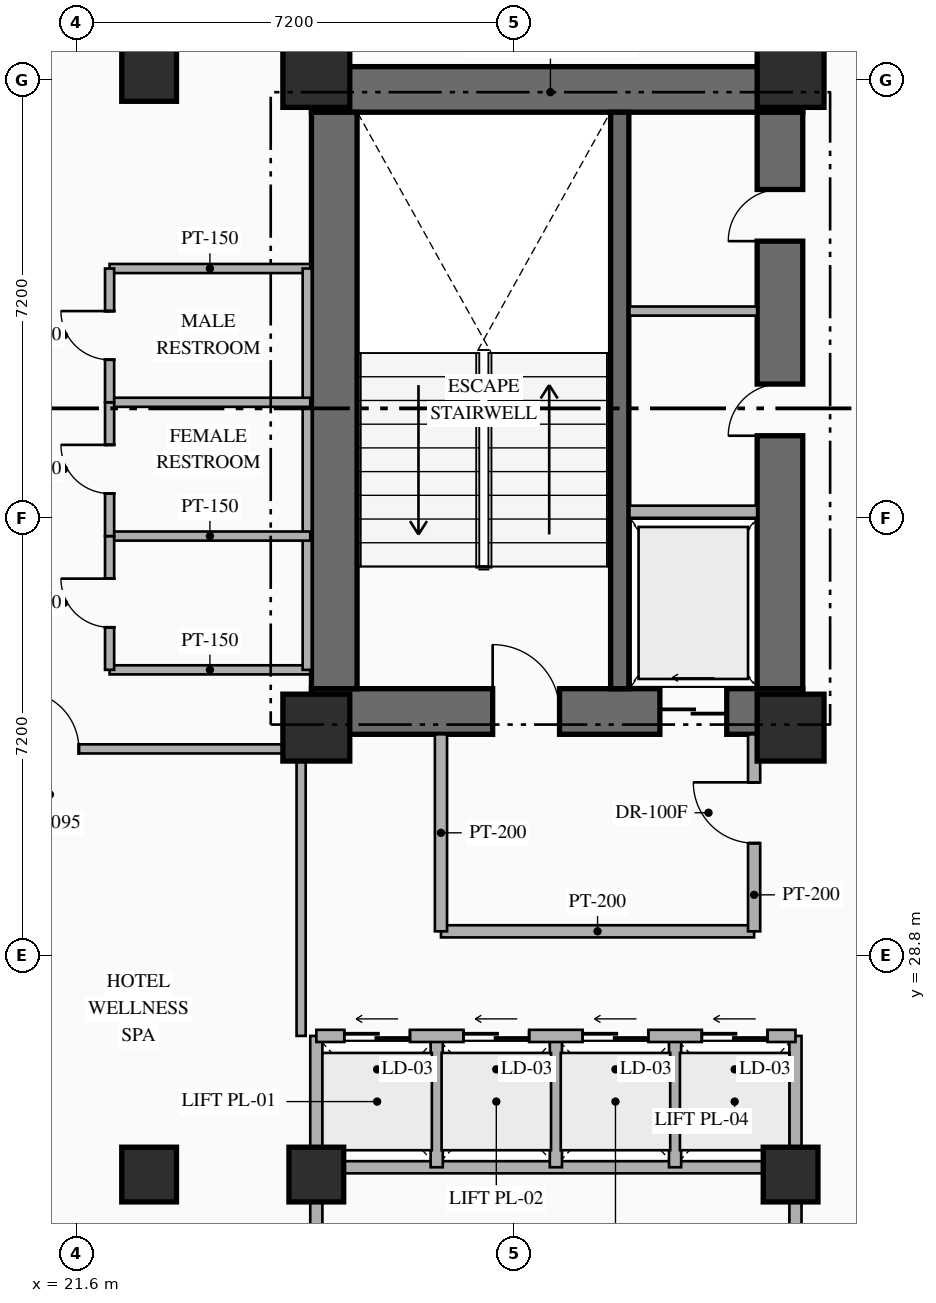
"""IFC4 building model, lengths in metres.
Left out: names, types, materials, properties, quantities, classifications, styles, units other than length and angle.
Written with IfcOpenShell. Run it as: python <this file> out.ifc"""

import sys

from ifc_helpers import new_model, si_unit, direction, frame, frame_2d, origin, origin_2d, place, context, subcontext, project, spatial, rectangle, hollow_rectangle, extrude, element, fill, save


model = new_model("IFC4")
c1 = context("Model", 3, precision=1e-05, world=origin(), true_north=direction((0.0, 1.0)))
c2 = subcontext(c1, "Body", "Model", "MODEL_VIEW")
j1 = project(units=[si_unit("LENGTHUNIT", "METRE"), si_unit("PLANEANGLEUNIT", "RADIAN")], contexts=[c1])
p1 = place(None, origin())
s1 = spatial("IfcSite", under=j1, at=p1, CompositionType="ELEMENT")
p2 = place(p1, origin())
s2 = spatial("IfcBuilding", under=s1, at=p2, CompositionType="ELEMENT")
p3 = place(p2, frame((0.0, 0.0, 88.0)))
s3 = spatial("IfcBuildingStorey", under=s2, at=p3, CompositionType="ELEMENT", Elevation=88.0)
p4 = place(p3, frame((25.47, 32.815, 0.0), z_axis=(0.0, 0.0, 1.0), x_axis=(1.0, 0.0, 0.0)))
e1 = element("IfcWall", 1, at=p4, inside=s3, PredefinedType="SHEAR", context=c2, shape_type="SweptSolid", body=[
    extrude(rectangle(XDim=8.08, YDim=0.75, at=frame_2d((4.04, 0.0))), origin(), (0.0, 0.0, 1.0), 3.35),
])
p5 = place(p4, frame((2.98, 0.0, 0.0)))
e2 = element("IfcOpeningElement", 2, at=p5, cuts=e1, PredefinedType="OPENING", context=c2, shape_type="SweptSolid", body=[
    extrude(rectangle(XDim=1.1, YDim=2.2, at=frame_2d((0.55, 1.1))), frame((0.0, 0.385, 0.0), z_axis=(0.0, -1.0, 0.0), x_axis=(1.0, 0.0, 0.0)), (0.0, 0.0, 1.0), 0.77),
])
p6 = place(p4, frame((5.73, 0.0, 0.0)))
e3 = element("IfcOpeningElement", 3, at=p6, cuts=e1, PredefinedType="OPENING", context=c2, shape_type="SweptSolid", body=[
    extrude(rectangle(XDim=1.1, YDim=2.15, at=frame_2d((0.55, 1.075))), frame((0.0, 0.385, 0.0), z_axis=(0.0, -1.0, 0.0), x_axis=(1.0, 0.0, 0.0)), (0.0, 0.0, 1.0), 0.77),
])
p7 = place(p3, frame((25.47, 43.045, 0.0), z_axis=(0.0, 0.0, 1.0), x_axis=(1.0, 0.0, 0.0)))
e4 = element("IfcWall", 4, at=p7, inside=s3, PredefinedType="SHEAR", context=c2, shape_type="SweptSolid", body=[
    extrude(rectangle(XDim=8.08, YDim=0.75, at=frame_2d((4.04, 0.0))), origin(), (0.0, 0.0, 1.0), 3.35),
])
p8 = place(p3, frame((25.845, 33.19, 0.0), z_axis=(0.0, 0.0, 1.0), x_axis=(0.0, 1.0, 0.0)))
e5 = element("IfcWall", 5, at=p8, inside=s3, PredefinedType="SHEAR", context=c2, shape_type="SweptSolid", body=[
    extrude(rectangle(XDim=9.48, YDim=0.75, at=frame_2d((4.74, 0.0))), origin(), (0.0, 0.0, 1.0), 3.35),
])
p9 = place(p3, frame((33.175, 33.19, 0.0), z_axis=(0.0, 0.0, 1.0), x_axis=(0.0, 1.0, 0.0)))
e6 = element("IfcWall", 6, at=p9, inside=s3, PredefinedType="SHEAR", context=c2, shape_type="SweptSolid", body=[
    extrude(rectangle(XDim=9.48, YDim=0.75, at=frame_2d((4.74, 0.0))), origin(), (0.0, 0.0, 1.0), 3.35),
])
p10 = place(p9, frame((4.16, 0.0, 0.0)))
e7 = element("IfcOpeningElement", 7, at=p10, cuts=e6, PredefinedType="OPENING", context=c2, shape_type="SweptSolid", body=[
    extrude(rectangle(XDim=0.85, YDim=2.08, at=frame_2d((0.425, 1.04))), frame((0.0, 0.385, 0.0), z_axis=(0.0, -1.0, 0.0), x_axis=(1.0, 0.0, 0.0)), (0.0, 0.0, 1.0), 0.77),
])
p11 = place(p9, frame((7.36, 0.0, 0.0)))
e8 = element("IfcOpeningElement", 8, at=p11, cuts=e6, PredefinedType="OPENING", context=c2, shape_type="SweptSolid", body=[
    extrude(rectangle(XDim=0.85, YDim=2.08, at=frame_2d((0.425, 1.04))), frame((0.0, 0.385, 0.0), z_axis=(0.0, -1.0, 0.0), x_axis=(1.0, 0.0, 0.0)), (0.0, 0.0, 1.0), 0.77),
])
p12 = place(p3, frame((30.54, 33.19, 0.0), z_axis=(0.0, 0.0, 1.0), x_axis=(0.0, 1.0, 0.0)))
e9 = element("IfcWall", 9, at=p12, inside=s3, PredefinedType="SHEAR", context=c2, shape_type="SweptSolid", body=[
    extrude(rectangle(XDim=9.48, YDim=0.3, at=frame_2d((4.74, 0.0))), origin(), (0.0, 0.0, 1.0), 3.35),
])
for number, where, z_axis, x_axis in (
    (10, (25.55, 32.55, 0.0), (0.0, 0.0, 1.0), (1.0, 0.0, 0.0)),
    (11, (33.35, 32.55, 0.0), (0.0, 0.0, 1.0), (1.0, 0.0, 0.0)),
    (12, (25.55, 43.3, 0.0), (0.0, 0.0, 1.0), (1.0, 0.0, 0.0)),
    (13, (33.35, 43.3, 0.0), (0.0, 0.0, 1.0), (1.0, 0.0, 0.0)),
):
    element("IfcColumn", number, at=place(p3, frame(where, z_axis=z_axis, x_axis=x_axis)), inside=s3, PredefinedType="COLUMN", context=c2, shape_type="SweptSolid", body=[
        extrude(rectangle(XDim=1.1, YDim=1.1, at=origin_2d()), origin(), (0.0, 0.0, 1.0), 3.35),
    ])
for number, where, z_axis, x_axis in (
    (14, (25.55, 25.2, 0.0), (0.0, 0.0, 1.0), (1.0, 0.0, 0.0)),
    (15, (33.35, 25.2, 0.0), (0.0, 0.0, 1.0), (1.0, 0.0, 0.0)),
    (16, (22.8, 25.2, 0.0), (0.0, 0.0, 1.0), (1.0, 0.0, 0.0)),
    (17, (22.8, 43.3, 0.0), (0.0, 0.0, 1.0), (1.0, 0.0, 0.0)),
):
    element("IfcColumn", number, at=place(p3, frame(where, z_axis=z_axis, x_axis=x_axis)), inside=s3, PredefinedType="COLUMN", context=c2, shape_type="SweptSolid", body=[
        extrude(hollow_rectangle(XDim=0.9, YDim=0.9, WallThickness=0.036, at=origin_2d()), origin(), (0.0, 0.0, 1.0), 3.35),
    ])
p13 = place(p3, frame((30.7, 36.1, 0.0), z_axis=(0.0, 0.0, 1.0), x_axis=(1.0, 0.0, 0.0)))
e18 = element("IfcWall", 18, at=p13, inside=s3, PredefinedType="STANDARD", context=c2, shape_type="SweptSolid", body=[
    extrude(rectangle(XDim=2.1, YDim=0.2, at=frame_2d((1.05, 0.0))), origin(), (0.0, 0.0, 1.0), 3.05),
])
p14 = place(p3, frame((30.7, 39.4, 0.0), z_axis=(0.0, 0.0, 1.0), x_axis=(1.0, 0.0, 0.0)))
e19 = element("IfcWall", 19, at=p14, inside=s3, PredefinedType="PARTITIONING", context=c2, shape_type="SweptSolid", body=[
    extrude(rectangle(XDim=2.1, YDim=0.15, at=frame_2d((1.05, 0.0))), origin(), (0.0, 0.0, 1.0), 3.05),
])
p15 = place(p3, frame((27.6, 29.2, 0.0), z_axis=(0.0, 0.0, 1.0), x_axis=(1.0, 0.0, 0.0)))
e20 = element("IfcWall", 20, at=p15, inside=s3, PredefinedType="STANDARD", context=c2, shape_type="SweptSolid", body=[
    extrude(rectangle(XDim=5.15, YDim=0.2, at=frame_2d((2.575, 0.0))), origin(), (0.0, 0.0, 1.0), 3.05),
])
p16 = place(p3, frame((27.6, 29.2, 0.0), z_axis=(0.0, 0.0, 1.0), x_axis=(0.0, 1.0, 0.0)))
e21 = element("IfcWall", 21, at=p16, inside=s3, PredefinedType="STANDARD", context=c2, shape_type="SweptSolid", body=[
    extrude(rectangle(XDim=3.24, YDim=0.2, at=frame_2d((1.62, 0.0))), origin(), (0.0, 0.0, 1.0), 3.05),
])
p17 = place(p3, frame((32.75, 29.2, 0.0), z_axis=(0.0, 0.0, 1.0), x_axis=(0.0, 1.0, 0.0)))
e22 = element("IfcWall", 22, at=p17, inside=s3, PredefinedType="STANDARD", context=c2, shape_type="SweptSolid", body=[
    extrude(rectangle(XDim=3.24, YDim=0.2, at=frame_2d((1.62, 0.0))), origin(), (0.0, 0.0, 1.0), 3.05),
])
p18 = place(p17, frame((1.45, 0.0, 0.0)))
e23 = element("IfcOpeningElement", 23, at=p18, cuts=e22, PredefinedType="OPENING", context=c2, shape_type="SweptSolid", body=[
    extrude(rectangle(XDim=1.0, YDim=2.2, at=frame_2d((0.5, 1.1))), frame((0.0, 0.11, 0.0), z_axis=(0.0, -1.0, 0.0), x_axis=(1.0, 0.0, 0.0)), (0.0, 0.0, 1.0), 0.22),
])
for number, where, z_axis, x_axis in (
    (24, (25.55, 23.4, 0.0), (0.0, 0.0, 1.0), (0.0, 1.0, 0.0)),
    (25, (33.43, 23.4, 0.0), (0.0, 0.0, 1.0), (0.0, 1.0, 0.0)),
):
    element("IfcWall", number, at=place(p3, frame(where, z_axis=z_axis, x_axis=x_axis)), inside=s3, PredefinedType="STANDARD", context=c2, shape_type="SweptSolid", body=[
        extrude(rectangle(XDim=4.08, YDim=0.2, at=frame_2d((2.04, 0.0))), origin(), (0.0, 0.0, 1.0), 2.345),
    ])
p19 = place(p3, frame((25.55, 25.32, 0.0), z_axis=(0.0, 0.0, 1.0), x_axis=(1.0, 0.0, 0.0)))
e26 = element("IfcWall", 26, at=p19, inside=s3, PredefinedType="STANDARD", context=c2, shape_type="SweptSolid", body=[
    extrude(rectangle(XDim=7.88, YDim=0.2, at=frame_2d((3.94, 0.0))), origin(), (0.0, 0.0, 1.0), 2.445),
])
for number, where, z_axis, x_axis in (
    (27, (27.53, 25.32, 0.0), (0.0, 0.0, 1.0), (0.0, 1.0, 0.0)),
    (28, (29.49, 25.32, 0.0), (0.0, 0.0, 1.0), (0.0, 1.0, 0.0)),
    (29, (31.45, 25.32, 0.0), (0.0, 0.0, 1.0), (0.0, 1.0, 0.0)),
):
    element("IfcWall", number, at=place(p3, frame(where, z_axis=z_axis, x_axis=x_axis)), inside=s3, PredefinedType="STANDARD", context=c2, shape_type="SweptSolid", body=[
        extrude(rectangle(XDim=2.16, YDim=0.2, at=frame_2d((1.08, 0.0))), origin(), (0.0, 0.0, 1.0), 3.05),
    ])
p20 = place(p3, frame((25.55, 27.48, 0.0), z_axis=(0.0, 0.0, 1.0), x_axis=(1.0, 0.0, 0.0)))
e30 = element("IfcWall", 30, at=p20, inside=s3, PredefinedType="STANDARD", context=c2, shape_type="SweptSolid", body=[
    extrude(rectangle(XDim=7.88, YDim=0.2, at=frame_2d((3.94, 0.0))), origin(), (0.0, 0.0, 1.0), 3.05),
])
p21 = place(p20, frame((0.46, 0.0, 0.0)))
e31 = element("IfcOpeningElement", 31, at=p21, cuts=e30, PredefinedType="OPENING", context=c2, shape_type="SweptSolid", body=[
    extrude(rectangle(XDim=1.08, YDim=2.15, at=frame_2d((0.54, 1.075))), frame((0.0, 0.11, 0.0), z_axis=(0.0, -1.0, 0.0), x_axis=(1.0, 0.0, 0.0)), (0.0, 0.0, 1.0), 0.22),
])
p22 = place(p20, frame((2.42, 0.0, 0.0)))
e32 = element("IfcOpeningElement", 32, at=p22, cuts=e30, PredefinedType="OPENING", context=c2, shape_type="SweptSolid", body=[
    extrude(rectangle(XDim=1.08, YDim=2.15, at=frame_2d((0.54, 1.075))), frame((0.0, 0.11, 0.0), z_axis=(0.0, -1.0, 0.0), x_axis=(1.0, 0.0, 0.0)), (0.0, 0.0, 1.0), 0.22),
])
p23 = place(p20, frame((4.38, 0.0, 0.0)))
e33 = element("IfcOpeningElement", 33, at=p23, cuts=e30, PredefinedType="OPENING", context=c2, shape_type="SweptSolid", body=[
    extrude(rectangle(XDim=1.08, YDim=2.15, at=frame_2d((0.54, 1.075))), frame((0.0, 0.11, 0.0), z_axis=(0.0, -1.0, 0.0), x_axis=(1.0, 0.0, 0.0)), (0.0, 0.0, 1.0), 0.22),
])
p24 = place(p20, frame((6.34, 0.0, 0.0)))
e34 = element("IfcOpeningElement", 34, at=p24, cuts=e30, PredefinedType="OPENING", context=c2, shape_type="SweptSolid", body=[
    extrude(rectangle(XDim=1.08, YDim=2.15, at=frame_2d((0.54, 1.075))), frame((0.0, 0.11, 0.0), z_axis=(0.0, -1.0, 0.0), x_axis=(1.0, 0.0, 0.0)), (0.0, 0.0, 1.0), 0.22),
])
for number, where, z_axis, x_axis in (
    (35, (22.15, 33.5, 0.0), (0.0, 0.0, 1.0), (1.0, 0.0, 0.0)),
    (36, (22.15, 40.1, 0.0), (0.0, 0.0, 1.0), (1.0, 0.0, 0.0)),
):
    element("IfcWall", number, at=place(p3, frame(where, z_axis=z_axis, x_axis=x_axis)), inside=s3, PredefinedType="PARTITIONING", context=c2, shape_type="SweptSolid", body=[
        extrude(rectangle(XDim=3.3, YDim=0.15, at=frame_2d((1.65, 0.0))), origin(), (0.0, 0.0, 1.0), 3.05),
    ])
p25 = place(p3, frame((25.4, 33.5, 0.0), z_axis=(0.0, 0.0, 1.0), x_axis=(0.0, 1.0, 0.0)))
e37 = element("IfcWall", 37, at=p25, inside=s3, PredefinedType="PARTITIONING", context=c2, shape_type="SweptSolid", body=[
    extrude(rectangle(XDim=6.6, YDim=0.15, at=frame_2d((3.3, 0.0))), origin(), (0.0, 0.0, 1.0), 3.05),
])
for number, where, z_axis, x_axis in (
    (38, (22.15, 35.7, 0.0), (0.0, 0.0, 1.0), (1.0, 0.0, 0.0)),
    (39, (22.15, 37.9, 0.0), (0.0, 0.0, 1.0), (1.0, 0.0, 0.0)),
):
    element("IfcWall", number, at=place(p3, frame(where, z_axis=z_axis, x_axis=x_axis)), inside=s3, PredefinedType="PARTITIONING", context=c2, shape_type="SweptSolid", body=[
        extrude(rectangle(XDim=3.3, YDim=0.15, at=frame_2d((1.65, 0.0))), origin(), (0.0, 0.0, 1.0), 3.05),
    ])
p26 = place(p3, frame((22.15, 33.5, 0.0), z_axis=(0.0, 0.0, 1.0), x_axis=(0.0, 1.0, 0.0)))
e40 = element("IfcWall", 40, at=p26, inside=s3, PredefinedType="PARTITIONING", context=c2, shape_type="SweptSolid", body=[
    extrude(rectangle(XDim=2.2, YDim=0.15, at=frame_2d((1.1, 0.0))), origin(), (0.0, 0.0, 1.0), 3.05),
])
p27 = place(p26, frame((0.7, 0.0, 0.0)))
e41 = element("IfcOpeningElement", 41, at=p27, cuts=e40, PredefinedType="OPENING", context=c2, shape_type="SweptSolid", body=[
    extrude(rectangle(XDim=0.8, YDim=2.06, at=frame_2d((0.4, 1.03))), frame((0.0, 0.085, 0.0), z_axis=(0.0, -1.0, 0.0), x_axis=(1.0, 0.0, 0.0)), (0.0, 0.0, 1.0), 0.17),
])
p28 = place(p3, frame((22.15, 35.7, 0.0), z_axis=(0.0, 0.0, 1.0), x_axis=(0.0, 1.0, 0.0)))
e42 = element("IfcWall", 42, at=p28, inside=s3, PredefinedType="PARTITIONING", context=c2, shape_type="SweptSolid", body=[
    extrude(rectangle(XDim=2.2, YDim=0.15, at=frame_2d((1.1, 0.0))), origin(), (0.0, 0.0, 1.0), 3.05),
])
p29 = place(p28, frame((0.7, 0.0, 0.0)))
e43 = element("IfcOpeningElement", 43, at=p29, cuts=e42, PredefinedType="OPENING", context=c2, shape_type="SweptSolid", body=[
    extrude(rectangle(XDim=0.8, YDim=2.06, at=frame_2d((0.4, 1.03))), frame((0.0, 0.085, 0.0), z_axis=(0.0, -1.0, 0.0), x_axis=(1.0, 0.0, 0.0)), (0.0, 0.0, 1.0), 0.17),
])
p30 = place(p3, frame((22.15, 37.9, 0.0), z_axis=(0.0, 0.0, 1.0), x_axis=(0.0, 1.0, 0.0)))
e44 = element("IfcWall", 44, at=p30, inside=s3, PredefinedType="PARTITIONING", context=c2, shape_type="SweptSolid", body=[
    extrude(rectangle(XDim=2.2, YDim=0.15, at=frame_2d((1.1, 0.0))), origin(), (0.0, 0.0, 1.0), 3.05),
])
p31 = place(p30, frame((0.7, 0.0, 0.0)))
e45 = element("IfcOpeningElement", 45, at=p31, cuts=e44, PredefinedType="OPENING", context=c2, shape_type="SweptSolid", body=[
    extrude(rectangle(XDim=0.8, YDim=2.06, at=frame_2d((0.4, 1.03))), frame((0.0, 0.085, 0.0), z_axis=(0.0, -1.0, 0.0), x_axis=(1.0, 0.0, 0.0)), (0.0, 0.0, 1.0), 0.17),
])
p32 = place(p3, frame((33.384, 17.312, 0.0), z_axis=(0.0, 0.0, 1.0), x_axis=(0.600008743659, 0.799993442181, 0.0)))
e46 = element("IfcWall", 46, at=p32, inside=s3, PredefinedType="PARTITIONING", context=c2, shape_type="SweptSolid", body=[
    extrude(rectangle(XDim=8.935, YDim=0.15, at=frame_2d((4.468, 0.0))), origin(), (0.0, 0.0, 1.0), 3.05),
])
p33 = place(p3, frame((19.95, 32.2, 0.0), z_axis=(0.0, 0.0, 1.0), x_axis=(1.0, 0.0, 0.0)))
e47 = element("IfcWall", 47, at=p33, inside=s3, PredefinedType="PARTITIONING", context=c2, shape_type="SweptSolid", body=[
    extrude(rectangle(XDim=5.35, YDim=0.15, at=frame_2d((2.675, 0.0))), origin(), (0.0, 0.0, 1.0), 3.05),
])
p34 = place(p33, frame((0.744, 0.0, 0.0)))
e48 = element("IfcOpeningElement", 48, at=p34, cuts=e47, PredefinedType="OPENING", context=c2, shape_type="SweptSolid", body=[
    extrude(rectangle(XDim=0.95, YDim=2.15, at=frame_2d((0.475, 1.075))), frame((0.0, 0.085, 0.0), z_axis=(0.0, -1.0, 0.0), x_axis=(1.0, 0.0, 0.0)), (0.0, 0.0, 1.0), 0.17),
])
p35 = place(p3, frame((25.3, 27.48, 0.0), z_axis=(0.0, 0.0, 1.0), x_axis=(0.0, 1.0, 0.0)))
e49 = element("IfcWall", 49, at=p35, inside=s3, PredefinedType="PARTITIONING", context=c2, shape_type="SweptSolid", body=[
    extrude(rectangle(XDim=4.72, YDim=0.15, at=frame_2d((2.36, 0.0))), origin(), (0.0, 0.0, 1.0), 2.345),
])
p36 = place(p5, origin())
e50 = element("IfcDoor", 50, at=p36, inside=s3, OperationType="SINGLE_SWING_LEFT", PredefinedType="DOOR", context=c2, shape_type="SweptSolid", body=[
    extrude(rectangle(XDim=1.1, YDim=2.2, at=frame_2d((0.55, 1.1))), frame((0.0, 0.025, 0.0), z_axis=(0.0, -1.0, 0.0), x_axis=(1.0, 0.0, 0.0)), (0.0, 0.0, 1.0), 0.05),
])
fill(e2, e50)
p37 = place(p6, origin())
e51 = element("IfcDoor", 51, at=p37, inside=s3, OperationType="SLIDING_TO_LEFT", PredefinedType="USERDEFINED", context=c2, shape_type="SweptSolid", body=[
    extrude(rectangle(XDim=1.1, YDim=2.15, at=frame_2d((0.55, 1.075))), frame((0.0, 0.025, 0.0), z_axis=(0.0, -1.0, 0.0), x_axis=(1.0, 0.0, 0.0)), (0.0, 0.0, 1.0), 0.05),
])
fill(e3, e51)
p38 = place(p10, origin())
e52 = element("IfcDoor", 52, at=p38, inside=s3, OperationType="SINGLE_SWING_LEFT", PredefinedType="DOOR", context=c2, shape_type="SweptSolid", body=[
    extrude(rectangle(XDim=0.85, YDim=2.08, at=frame_2d((0.425, 1.04))), frame((0.0, 0.025, 0.0), z_axis=(0.0, -1.0, 0.0), x_axis=(1.0, 0.0, 0.0)), (0.0, 0.0, 1.0), 0.05),
])
fill(e7, e52)
p39 = place(p11, origin())
e53 = element("IfcDoor", 53, at=p39, inside=s3, OperationType="SINGLE_SWING_LEFT", PredefinedType="DOOR", context=c2, shape_type="SweptSolid", body=[
    extrude(rectangle(XDim=0.85, YDim=2.08, at=frame_2d((0.425, 1.04))), frame((0.0, 0.025, 0.0), z_axis=(0.0, -1.0, 0.0), x_axis=(1.0, 0.0, 0.0)), (0.0, 0.0, 1.0), 0.05),
])
fill(e8, e53)
p40 = place(p18, origin())
e54 = element("IfcDoor", 54, at=p40, inside=s3, OperationType="SINGLE_SWING_RIGHT", PredefinedType="DOOR", context=c2, shape_type="SweptSolid", body=[
    extrude(rectangle(XDim=1.0, YDim=2.2, at=frame_2d((0.5, 1.1))), frame((0.0, 0.025, 0.0), z_axis=(0.0, -1.0, 0.0), x_axis=(1.0, 0.0, 0.0)), (0.0, 0.0, 1.0), 0.05),
])
fill(e23, e54)
p41 = place(p21, origin())
e55 = element("IfcDoor", 55, at=p41, inside=s3, OperationType="SLIDING_TO_LEFT", PredefinedType="USERDEFINED", context=c2, shape_type="SweptSolid", body=[
    extrude(rectangle(XDim=1.08, YDim=2.15, at=frame_2d((0.54, 1.075))), frame((0.0, 0.025, 0.0), z_axis=(0.0, -1.0, 0.0), x_axis=(1.0, 0.0, 0.0)), (0.0, 0.0, 1.0), 0.05),
])
fill(e31, e55)
p42 = place(p22, origin())
e56 = element("IfcDoor", 56, at=p42, inside=s3, OperationType="SLIDING_TO_LEFT", PredefinedType="USERDEFINED", context=c2, shape_type="SweptSolid", body=[
    extrude(rectangle(XDim=1.08, YDim=2.15, at=frame_2d((0.54, 1.075))), frame((0.0, 0.025, 0.0), z_axis=(0.0, -1.0, 0.0), x_axis=(1.0, 0.0, 0.0)), (0.0, 0.0, 1.0), 0.05),
])
fill(e32, e56)
p43 = place(p23, origin())
e57 = element("IfcDoor", 57, at=p43, inside=s3, OperationType="SLIDING_TO_LEFT", PredefinedType="USERDEFINED", context=c2, shape_type="SweptSolid", body=[
    extrude(rectangle(XDim=1.08, YDim=2.15, at=frame_2d((0.54, 1.075))), frame((0.0, 0.025, 0.0), z_axis=(0.0, -1.0, 0.0), x_axis=(1.0, 0.0, 0.0)), (0.0, 0.0, 1.0), 0.05),
])
fill(e33, e57)
p44 = place(p24, origin())
e58 = element("IfcDoor", 58, at=p44, inside=s3, OperationType="SLIDING_TO_LEFT", PredefinedType="USERDEFINED", context=c2, shape_type="SweptSolid", body=[
    extrude(rectangle(XDim=1.08, YDim=2.15, at=frame_2d((0.54, 1.075))), frame((0.0, 0.025, 0.0), z_axis=(0.0, -1.0, 0.0), x_axis=(1.0, 0.0, 0.0)), (0.0, 0.0, 1.0), 0.05),
])
fill(e34, e58)
p45 = place(p27, origin())
e59 = element("IfcDoor", 59, at=p45, inside=s3, OperationType="SINGLE_SWING_RIGHT", PredefinedType="DOOR", context=c2, shape_type="SweptSolid", body=[
    extrude(rectangle(XDim=0.8, YDim=2.06, at=frame_2d((0.4, 1.03))), frame((0.0, 0.025, 0.0), z_axis=(0.0, -1.0, 0.0), x_axis=(1.0, 0.0, 0.0)), (0.0, 0.0, 1.0), 0.05),
])
fill(e41, e59)
p46 = place(p29, origin())
e60 = element("IfcDoor", 60, at=p46, inside=s3, OperationType="SINGLE_SWING_RIGHT", PredefinedType="DOOR", context=c2, shape_type="SweptSolid", body=[
    extrude(rectangle(XDim=0.8, YDim=2.06, at=frame_2d((0.4, 1.03))), frame((0.0, 0.025, 0.0), z_axis=(0.0, -1.0, 0.0), x_axis=(1.0, 0.0, 0.0)), (0.0, 0.0, 1.0), 0.05),
])
fill(e43, e60)
p47 = place(p31, origin())
e61 = element("IfcDoor", 61, at=p47, inside=s3, OperationType="SINGLE_SWING_RIGHT", PredefinedType="DOOR", context=c2, shape_type="SweptSolid", body=[
    extrude(rectangle(XDim=0.8, YDim=2.06, at=frame_2d((0.4, 1.03))), frame((0.0, 0.025, 0.0), z_axis=(0.0, -1.0, 0.0), x_axis=(1.0, 0.0, 0.0)), (0.0, 0.0, 1.0), 0.05),
])
fill(e45, e61)
p48 = place(p34, origin())
e62 = element("IfcDoor", 62, at=p48, inside=s3, OperationType="SINGLE_SWING_LEFT", PredefinedType="DOOR", context=c2, shape_type="SweptSolid", body=[
    extrude(rectangle(XDim=0.95, YDim=2.15, at=frame_2d((0.475, 1.075))), frame((0.0, 0.025, 0.0), z_axis=(0.0, -1.0, 0.0), x_axis=(1.0, 0.0, 0.0)), (0.0, 0.0, 1.0), 0.05),
])
fill(e48, e62)
save(model, sys.argv[1])
